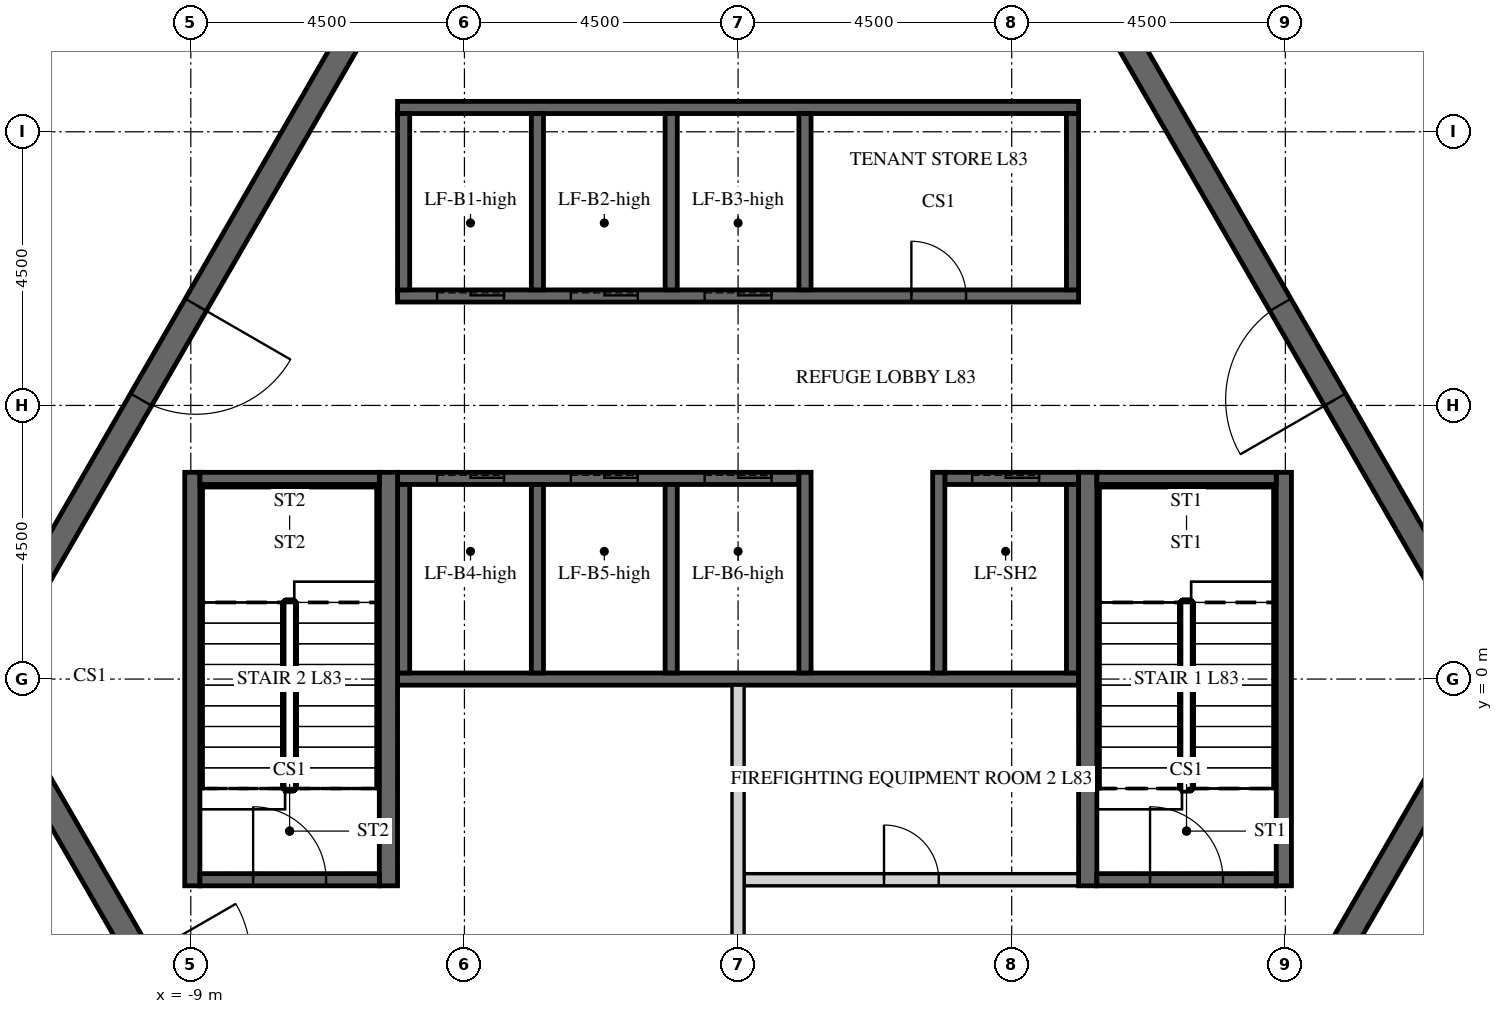
"""IFC4 building model, lengths in metres.
Left out: names, types, materials, properties, quantities, classifications, styles, units other than length and angle.
Written with IfcOpenShell. Run it as: python <this file> out.ifc"""

import sys

from ifc_helpers import new_model, si_unit, direction, frame, frame_2d, origin, place, context, subcontext, project, spatial, polyline, rectangle, outline, extrude, element, fill, save


model = new_model("IFC4")
c1 = context("Model", 3, precision=1e-05, world=origin(), true_north=direction((0.0, 1.0)))
c2 = subcontext(c1, "Body", "Model", "MODEL_VIEW")
j1 = project(units=[si_unit("LENGTHUNIT", "METRE"), si_unit("PLANEANGLEUNIT", "RADIAN")], contexts=[c1])
p1 = place(None, origin())
s1 = spatial("IfcSite", under=j1, at=p1, CompositionType="ELEMENT")
p2 = place(p1, origin())
s2 = spatial("IfcBuilding", under=s1, at=p2, CompositionType="ELEMENT")
p3 = place(p2, frame((0.0, 0.0, 343.5)))
s3 = spatial("IfcBuildingStorey", under=s2, at=p3, CompositionType="ELEMENT", Elevation=343.5)
p4 = place(p3, frame((-6.235, 10.8, -0.3), z_axis=(0.0, 0.0, 1.0), x_axis=(-0.499996419489, -0.866027470984, 0.0)))
e1 = element("IfcWall", 1, at=p4, inside=s3, PredefinedType="SHEAR", context=c2, shape_type="SweptSolid", body=[
    extrude(outline(polyline([(-0.115, -0.2), (12.586, -0.2), (12.355, 0.2), (0.115, 0.2), (-0.115, -0.2)])), origin(), (0.0, 0.0, 1.0), 5.8),
])
p5 = place(p4, frame((5.364, 0.0, 0.3)))
e2 = element("IfcOpeningElement", 2, at=p5, cuts=e1, PredefinedType="OPENING", context=c2, shape_type="SweptSolid", body=[
    extrude(rectangle(XDim=1.8, YDim=2.4, at=frame_2d((0.9, 1.2))), frame((0.0, 0.21, 0.0), z_axis=(0.0, -1.0, 0.0), x_axis=(1.0, 0.0, 0.0)), (0.0, 0.0, 1.0), 0.42),
])
p6 = place(p3, frame((-12.471, 0.0, -0.3), z_axis=(0.0, 0.0, 1.0), x_axis=(0.499996419489, -0.866027470984, 0.0)))
e3 = element("IfcWall", 3, at=p6, inside=s3, PredefinedType="SHEAR", context=c2, shape_type="SweptSolid", body=[
    extrude(outline(polyline([(-0.115, -0.2), (12.586, -0.2), (12.355, 0.2), (0.115, 0.2), (-0.115, -0.2)])), origin(), (0.0, 0.0, 1.0), 5.8),
])
p7 = place(p6, frame((5.306, 0.0, 0.3)))
e4 = element("IfcOpeningElement", 4, at=p7, cuts=e3, PredefinedType="OPENING", context=c2, shape_type="SweptSolid", body=[
    extrude(rectangle(XDim=1.8, YDim=2.4, at=frame_2d((0.9, 1.2))), frame((0.0, 0.21, 0.0), z_axis=(0.0, -1.0, 0.0), x_axis=(1.0, 0.0, 0.0)), (0.0, 0.0, 1.0), 0.42),
])
p8 = place(p3, frame((6.235, -10.8, -0.3), z_axis=(0.0, 0.0, 1.0), x_axis=(0.499996419489, 0.866027470984, 0.0)))
e5 = element("IfcWall", 5, at=p8, inside=s3, PredefinedType="SHEAR", context=c2, shape_type="SweptSolid", body=[
    extrude(outline(polyline([(-0.115, -0.2), (12.586, -0.2), (12.355, 0.2), (0.115, 0.2), (-0.115, -0.2)])), origin(), (0.0, 0.0, 1.0), 5.8),
])
p9 = place(p8, frame((5.364, 0.0, 0.3)))
e6 = element("IfcOpeningElement", 6, at=p9, cuts=e5, PredefinedType="OPENING", context=c2, shape_type="SweptSolid", body=[
    extrude(rectangle(XDim=1.8, YDim=2.4, at=frame_2d((0.9, 1.2))), frame((0.0, 0.21, 0.0), z_axis=(0.0, -1.0, 0.0), x_axis=(1.0, 0.0, 0.0)), (0.0, 0.0, 1.0), 0.42),
])
p10 = place(p3, frame((12.471, 0.0, -0.3), z_axis=(0.0, 0.0, 1.0), x_axis=(-0.499996419489, 0.866027470984, 0.0)))
e7 = element("IfcWall", 7, at=p10, inside=s3, PredefinedType="SHEAR", context=c2, shape_type="SweptSolid", body=[
    extrude(outline(polyline([(-0.115, -0.2), (12.586, -0.2), (12.355, 0.2), (0.115, 0.2), (-0.115, -0.2)])), origin(), (0.0, 0.0, 1.0), 5.8),
])
p11 = place(p10, frame((5.306, 0.0, 0.3)))
e8 = element("IfcOpeningElement", 8, at=p11, cuts=e7, PredefinedType="OPENING", context=c2, shape_type="SweptSolid", body=[
    extrude(rectangle(XDim=1.8, YDim=2.4, at=frame_2d((0.9, 1.2))), frame((0.0, 0.21, 0.0), z_axis=(0.0, -1.0, 0.0), x_axis=(1.0, 0.0, 0.0)), (0.0, 0.0, 1.0), 0.42),
])
p12 = place(p3, frame((-5.6, 6.3, -0.25), z_axis=(0.0, 0.0, 1.0), x_axis=(1.0, 0.0, 0.0)))
e9 = element("IfcWall", 9, at=p12, inside=s3, PredefinedType="SHEAR", context=c2, shape_type="SweptSolid", body=[
    extrude(rectangle(XDim=11.2, YDim=0.2, at=frame_2d((5.6, 0.0))), origin(), (0.0, 0.0, 1.0), 5.75),
])
p13 = place(p12, frame((8.45, 0.0, 0.25)))
e10 = element("IfcOpeningElement", 10, at=p13, cuts=e9, PredefinedType="OPENING", context=c2, shape_type="SweptSolid", body=[
    extrude(rectangle(XDim=0.9, YDim=2.1, at=frame_2d((0.45, 1.05))), frame((0.0, 0.11, 0.0), z_axis=(0.0, -1.0, 0.0), x_axis=(1.0, 0.0, 0.0)), (0.0, 0.0, 1.0), 0.22),
])
p14 = place(p12, frame((0.65, 0.0, 0.25)))
e11 = element("IfcOpeningElement", 11, at=p14, cuts=e9, PredefinedType="OPENING", context=c2, shape_type="SweptSolid", body=[
    extrude(rectangle(XDim=1.1, YDim=2.1, at=frame_2d((0.55, 1.05))), frame((0.0, 0.11, 0.0), z_axis=(0.0, -1.0, 0.0), x_axis=(1.0, 0.0, 0.0)), (0.0, 0.0, 1.0), 0.22),
])
p15 = place(p12, frame((2.85, 0.0, 0.25)))
e12 = element("IfcOpeningElement", 12, at=p15, cuts=e9, PredefinedType="OPENING", context=c2, shape_type="SweptSolid", body=[
    extrude(rectangle(XDim=1.1, YDim=2.1, at=frame_2d((0.55, 1.05))), frame((0.0, 0.11, 0.0), z_axis=(0.0, -1.0, 0.0), x_axis=(1.0, 0.0, 0.0)), (0.0, 0.0, 1.0), 0.22),
])
p16 = place(p12, frame((5.05, 0.0, 0.25)))
e13 = element("IfcOpeningElement", 13, at=p16, cuts=e9, PredefinedType="OPENING", context=c2, shape_type="SweptSolid", body=[
    extrude(rectangle(XDim=1.1, YDim=2.1, at=frame_2d((0.55, 1.05))), frame((0.0, 0.11, 0.0), z_axis=(0.0, -1.0, 0.0), x_axis=(1.0, 0.0, 0.0)), (0.0, 0.0, 1.0), 0.22),
])
p17 = place(p3, frame((-5.6, 9.4, -0.25), z_axis=(0.0, 0.0, 1.0), x_axis=(1.0, 0.0, 0.0)))
e14 = element("IfcWall", 14, at=p17, inside=s3, PredefinedType="SHEAR", context=c2, shape_type="SweptSolid", body=[
    extrude(rectangle(XDim=11.2, YDim=0.2, at=frame_2d((5.6, 0.0))), origin(), (0.0, 0.0, 1.0), 5.75),
])
for number, where, z_axis, x_axis in (
    (15, (-5.5, 6.4, -0.25), (0.0, 0.0, 1.0), (0.0, 1.0, 0.0)),
    (16, (-3.3, 6.4, -0.25), (0.0, 0.0, 1.0), (0.0, 1.0, 0.0)),
    (17, (-1.1, 6.4, -0.25), (0.0, 0.0, 1.0), (0.0, 1.0, 0.0)),
    (18, (1.1, 6.4, -0.25), (0.0, 0.0, 1.0), (0.0, 1.0, 0.0)),
    (19, (5.5, 6.4, -0.25), (0.0, 0.0, 1.0), (0.0, 1.0, 0.0)),
):
    element("IfcWall", number, at=place(p3, frame(where, z_axis=z_axis, x_axis=x_axis)), inside=s3, PredefinedType="SHEAR", context=c2, shape_type="SweptSolid", body=[
        extrude(rectangle(XDim=2.9, YDim=0.2, at=frame_2d((1.45, 0.0))), origin(), (0.0, 0.0, 1.0), 5.75),
    ])
p18 = place(p3, frame((-5.6, 3.3, -0.25), z_axis=(0.0, 0.0, 1.0), x_axis=(1.0, 0.0, 0.0)))
e20 = element("IfcWall", 20, at=p18, inside=s3, PredefinedType="SHEAR", context=c2, shape_type="SweptSolid", body=[
    extrude(rectangle(XDim=6.6, YDim=0.2, at=frame_2d((3.3, 0.0))), origin(), (0.0, 0.0, 1.0), 5.75),
])
p19 = place(p18, frame((0.65, 0.0, 0.25)))
e21 = element("IfcOpeningElement", 21, at=p19, cuts=e20, PredefinedType="OPENING", context=c2, shape_type="SweptSolid", body=[
    extrude(rectangle(XDim=1.1, YDim=2.1, at=frame_2d((0.55, 1.05))), frame((0.0, 0.11, 0.0), z_axis=(0.0, -1.0, 0.0), x_axis=(1.0, 0.0, 0.0)), (0.0, 0.0, 1.0), 0.22),
])
p20 = place(p18, frame((2.85, 0.0, 0.25)))
e22 = element("IfcOpeningElement", 22, at=p20, cuts=e20, PredefinedType="OPENING", context=c2, shape_type="SweptSolid", body=[
    extrude(rectangle(XDim=1.1, YDim=2.1, at=frame_2d((0.55, 1.05))), frame((0.0, 0.11, 0.0), z_axis=(0.0, -1.0, 0.0), x_axis=(1.0, 0.0, 0.0)), (0.0, 0.0, 1.0), 0.22),
])
p21 = place(p18, frame((5.05, 0.0, 0.25)))
e23 = element("IfcOpeningElement", 23, at=p21, cuts=e20, PredefinedType="OPENING", context=c2, shape_type="SweptSolid", body=[
    extrude(rectangle(XDim=1.1, YDim=2.1, at=frame_2d((0.55, 1.05))), frame((0.0, 0.11, 0.0), z_axis=(0.0, -1.0, 0.0), x_axis=(1.0, 0.0, 0.0)), (0.0, 0.0, 1.0), 0.22),
])
p22 = place(p3, frame((3.4, 3.3, -0.25), z_axis=(0.0, 0.0, 1.0), x_axis=(1.0, 0.0, 0.0)))
e24 = element("IfcWall", 24, at=p22, inside=s3, PredefinedType="SHEAR", context=c2, shape_type="SweptSolid", body=[
    extrude(rectangle(XDim=2.2, YDim=0.2, at=frame_2d((1.1, 0.0))), origin(), (0.0, 0.0, 1.0), 5.75),
])
p23 = place(p22, frame((0.45, 0.0, 0.25)))
e25 = element("IfcOpeningElement", 25, at=p23, cuts=e24, PredefinedType="OPENING", context=c2, shape_type="SweptSolid", body=[
    extrude(rectangle(XDim=1.1, YDim=2.1, at=frame_2d((0.55, 1.05))), frame((0.0, 0.11, 0.0), z_axis=(0.0, -1.0, 0.0), x_axis=(1.0, 0.0, 0.0)), (0.0, 0.0, 1.0), 0.22),
])
p24 = place(p3, frame((-5.6, 0.0, -0.25), z_axis=(0.0, 0.0, 1.0), x_axis=(1.0, 0.0, 0.0)))
e26 = element("IfcWall", 26, at=p24, inside=s3, PredefinedType="SHEAR", context=c2, shape_type="SweptSolid", body=[
    extrude(rectangle(XDim=11.2, YDim=0.2, at=frame_2d((5.6, 0.0))), origin(), (0.0, 0.0, 1.0), 5.75),
])
for number, where, z_axis, x_axis in (
    (27, (-5.5, 0.1, -0.25), (0.0, 0.0, 1.0), (0.0, 1.0, 0.0)),
    (28, (-3.3, 0.1, -0.25), (0.0, 0.0, 1.0), (0.0, 1.0, 0.0)),
    (29, (-1.1, 0.1, -0.25), (0.0, 0.0, 1.0), (0.0, 1.0, 0.0)),
):
    element("IfcWall", number, at=place(p3, frame(where, z_axis=z_axis, x_axis=x_axis)), inside=s3, PredefinedType="SHEAR", context=c2, shape_type="SweptSolid", body=[
        extrude(rectangle(XDim=3.1, YDim=0.2, at=frame_2d((1.55, 0.0))), origin(), (0.0, 0.0, 1.0), 5.75),
    ])
for number, where, z_axis, x_axis in (
    (30, (1.1, 0.1, -0.25), (0.0, 0.0, 1.0), (0.0, 1.0, 0.0)),
    (31, (3.3, 0.1, -0.25), (0.0, 0.0, 1.0), (0.0, 1.0, 0.0)),
):
    element("IfcWall", number, at=place(p3, frame(where, z_axis=z_axis, x_axis=x_axis)), inside=s3, PredefinedType="SHEAR", context=c2, shape_type="SweptSolid", body=[
        extrude(rectangle(XDim=3.3, YDim=0.2, at=frame_2d((1.65, 0.0))), origin(), (0.0, 0.0, 1.0), 5.75),
    ])
p25 = place(p3, frame((5.5, 0.1, -0.25), z_axis=(0.0, 0.0, 1.0), x_axis=(0.0, 1.0, 0.0)))
e32 = element("IfcWall", 32, at=p25, inside=s3, PredefinedType="SHEAR", context=c2, shape_type="SweptSolid", body=[
    extrude(rectangle(XDim=3.1, YDim=0.2, at=frame_2d((1.55, 0.0))), origin(), (0.0, 0.0, 1.0), 5.75),
])
p26 = place(p3, frame((0.1, -3.3, 0.0), z_axis=(0.0, 0.0, 1.0), x_axis=(1.0, 0.0, 0.0)))
e33 = element("IfcWall", 33, at=p26, inside=s3, PredefinedType="PARTITIONING", context=c2, shape_type="SweptSolid", body=[
    extrude(rectangle(XDim=5.5, YDim=0.2, at=frame_2d((2.75, 0.0))), origin(), (0.0, 0.0, 1.0), 5.5),
])
p27 = place(p26, frame((2.3, 0.0, 0.0)))
e34 = element("IfcOpeningElement", 34, at=p27, cuts=e33, PredefinedType="OPENING", context=c2, shape_type="SweptSolid", body=[
    extrude(rectangle(XDim=0.9, YDim=2.1, at=frame_2d((0.45, 1.05))), frame((0.0, 0.11, 0.0), z_axis=(0.0, -1.0, 0.0), x_axis=(1.0, 0.0, 0.0)), (0.0, 0.0, 1.0), 0.22),
])
p28 = place(p3, frame((0.0, -6.2, 0.0), z_axis=(0.0, 0.0, 1.0), x_axis=(0.0, 1.0, 0.0)))
e35 = element("IfcWall", 35, at=p28, inside=s3, PredefinedType="PARTITIONING", context=c2, shape_type="SweptSolid", body=[
    extrude(rectangle(XDim=6.1, YDim=0.2, at=frame_2d((3.05, 0.0))), origin(), (0.0, 0.0, 1.0), 5.5),
])
p29 = place(p3, frame((5.75, -3.4, -0.25), z_axis=(0.0, 0.0, 1.0), x_axis=(0.0, 1.0, 0.0)))
e36 = element("IfcWall", 36, at=p29, inside=s3, PredefinedType="SHEAR", context=c2, shape_type="SweptSolid", body=[
    extrude(rectangle(XDim=6.8, YDim=0.3, at=frame_2d((3.4, 0.0))), origin(), (0.0, 0.0, 1.0), 5.75),
])
p30 = place(p3, frame((8.975, -3.4, -0.25), z_axis=(0.0, 0.0, 1.0), x_axis=(0.0, 1.0, 0.0)))
e37 = element("IfcWall", 37, at=p30, inside=s3, PredefinedType="SHEAR", context=c2, shape_type="SweptSolid", body=[
    extrude(rectangle(XDim=6.8, YDim=0.25, at=frame_2d((3.4, 0.0))), origin(), (0.0, 0.0, 1.0), 5.75),
])
p31 = place(p3, frame((5.9, 3.3, -0.25), z_axis=(0.0, 0.0, 1.0), x_axis=(1.0, 0.0, 0.0)))
e38 = element("IfcWall", 38, at=p31, inside=s3, PredefinedType="SHEAR", context=c2, shape_type="SweptSolid", body=[
    extrude(rectangle(XDim=2.95, YDim=0.2, at=frame_2d((1.475, 0.0))), origin(), (0.0, 0.0, 1.0), 5.75),
])
p32 = place(p3, frame((5.9, -3.3, -0.25), z_axis=(0.0, 0.0, 1.0), x_axis=(1.0, 0.0, 0.0)))
e39 = element("IfcWall", 39, at=p32, inside=s3, PredefinedType="SHEAR", context=c2, shape_type="SweptSolid", body=[
    extrude(rectangle(XDim=2.95, YDim=0.2, at=frame_2d((1.475, 0.0))), origin(), (0.0, 0.0, 1.0), 5.75),
])
p33 = place(p32, frame((0.875, 0.0, 0.25)))
e40 = element("IfcOpeningElement", 40, at=p33, cuts=e39, PredefinedType="OPENING", context=c2, shape_type="SweptSolid", body=[
    extrude(rectangle(XDim=1.2, YDim=2.4, at=frame_2d((0.6, 1.2))), frame((0.0, 0.11, 0.0), z_axis=(0.0, -1.0, 0.0), x_axis=(1.0, 0.0, 0.0)), (0.0, 0.0, 1.0), 0.22),
])
p34 = place(p3, frame((-5.75, -3.4, -0.25), z_axis=(0.0, 0.0, 1.0), x_axis=(0.0, 1.0, 0.0)))
e41 = element("IfcWall", 41, at=p34, inside=s3, PredefinedType="SHEAR", context=c2, shape_type="SweptSolid", body=[
    extrude(rectangle(XDim=6.8, YDim=0.3, at=frame_2d((3.4, 0.0))), origin(), (0.0, 0.0, 1.0), 5.75),
])
p35 = place(p3, frame((-8.975, -3.4, -0.25), z_axis=(0.0, 0.0, 1.0), x_axis=(0.0, 1.0, 0.0)))
e42 = element("IfcWall", 42, at=p35, inside=s3, PredefinedType="SHEAR", context=c2, shape_type="SweptSolid", body=[
    extrude(rectangle(XDim=6.8, YDim=0.25, at=frame_2d((3.4, 0.0))), origin(), (0.0, 0.0, 1.0), 5.75),
])
p36 = place(p3, frame((-8.85, 3.3, -0.25), z_axis=(0.0, 0.0, 1.0), x_axis=(1.0, 0.0, 0.0)))
e43 = element("IfcWall", 43, at=p36, inside=s3, PredefinedType="SHEAR", context=c2, shape_type="SweptSolid", body=[
    extrude(rectangle(XDim=2.95, YDim=0.2, at=frame_2d((1.475, 0.0))), origin(), (0.0, 0.0, 1.0), 5.75),
])
p37 = place(p3, frame((-8.85, -3.3, -0.25), z_axis=(0.0, 0.0, 1.0), x_axis=(1.0, 0.0, 0.0)))
e44 = element("IfcWall", 44, at=p37, inside=s3, PredefinedType="SHEAR", context=c2, shape_type="SweptSolid", body=[
    extrude(rectangle(XDim=2.95, YDim=0.2, at=frame_2d((1.475, 0.0))), origin(), (0.0, 0.0, 1.0), 5.75),
])
p38 = place(p37, frame((0.875, 0.0, 0.25)))
e45 = element("IfcOpeningElement", 45, at=p38, cuts=e44, PredefinedType="OPENING", context=c2, shape_type="SweptSolid", body=[
    extrude(rectangle(XDim=1.2, YDim=2.4, at=frame_2d((0.6, 1.2))), frame((0.0, 0.11, 0.0), z_axis=(0.0, -1.0, 0.0), x_axis=(1.0, 0.0, 0.0)), (0.0, 0.0, 1.0), 0.22),
])
p39 = place(p3, frame((-11.01, 19.07, 0.0), z_axis=(0.0, 0.0, 1.0), x_axis=(-0.500012125972, -0.866018402738, 0.0)))
e46 = element("IfcWall", 46, at=p39, inside=s3, PredefinedType="PARTITIONING", context=c2, shape_type="SweptSolid", body=[
    extrude(rectangle(XDim=21.79, YDim=0.2, at=frame_2d((10.895, 0.0))), origin(), (0.0, 0.0, 1.0), 5.5),
])
p40 = place(p39, frame((10.295, 0.0, 0.0)))
e47 = element("IfcOpeningElement", 47, at=p40, cuts=e46, PredefinedType="OPENING", context=c2, shape_type="SweptSolid", body=[
    extrude(rectangle(XDim=1.2, YDim=2.1, at=frame_2d((0.6, 1.05))), frame((0.0, 0.11, 0.0), z_axis=(0.0, -1.0, 0.0), x_axis=(1.0, 0.0, 0.0)), (0.0, 0.0, 1.0), 0.22),
])
p41 = place(p3, frame((11.126, -18.87, 0.0), z_axis=(0.0, 0.0, 1.0), x_axis=(0.499978511878, 0.866037809602, 0.0)))
e48 = element("IfcWall", 48, at=p41, inside=s3, PredefinedType="PARTITIONING", context=c2, shape_type="SweptSolid", body=[
    extrude(rectangle(XDim=21.789, YDim=0.2, at=frame_2d((10.895, 0.0))), origin(), (0.0, 0.0, 1.0), 4.573),
])
p42 = place(p41, frame((10.294, 0.0, 0.0)))
e49 = element("IfcOpeningElement", 49, at=p42, cuts=e48, PredefinedType="OPENING", context=c2, shape_type="SweptSolid", body=[
    extrude(rectangle(XDim=1.2, YDim=2.1, at=frame_2d((0.6, 1.05))), frame((0.0, 0.11, 0.0), z_axis=(0.0, -1.0, 0.0), x_axis=(1.0, 0.0, 0.0)), (0.0, 0.0, 1.0), 0.22),
])
p43 = place(p3, frame((21.962, 0.1, 0.0), z_axis=(0.0, 0.0, 1.0), x_axis=(-0.499975977678, 0.866039272634, 0.0)))
e50 = element("IfcWall", 50, at=p43, inside=s3, PredefinedType="PARTITIONING", context=c2, shape_type="SweptSolid", body=[
    extrude(rectangle(XDim=21.673, YDim=0.2, at=frame_2d((10.837, 0.0))), origin(), (0.0, 0.0, 1.0), 4.573),
])
p44 = place(p5, origin())
e51 = element("IfcDoor", 51, at=p44, inside=s3, OperationType="DOUBLE_DOOR_SINGLE_SWING", PredefinedType="DOOR", context=c2, shape_type="SweptSolid", body=[
    extrude(rectangle(XDim=1.8, YDim=2.4, at=frame_2d((0.9, 1.2))), frame((0.0, 0.025, 0.0), z_axis=(0.0, -1.0, 0.0), x_axis=(1.0, 0.0, 0.0)), (0.0, 0.0, 1.0), 0.05),
])
fill(e2, e51)
p45 = place(p11, origin())
e52 = element("IfcDoor", 52, at=p45, inside=s3, OperationType="DOUBLE_DOOR_SINGLE_SWING", PredefinedType="DOOR", context=c2, shape_type="SweptSolid", body=[
    extrude(rectangle(XDim=1.8, YDim=2.4, at=frame_2d((0.9, 1.2))), frame((0.0, 0.025, 0.0), z_axis=(0.0, -1.0, 0.0), x_axis=(1.0, 0.0, 0.0)), (0.0, 0.0, 1.0), 0.05),
])
fill(e8, e52)
p46 = place(p27, origin())
e53 = element("IfcDoor", 53, at=p46, inside=s3, OperationType="SINGLE_SWING_LEFT", PredefinedType="DOOR", context=c2, shape_type="SweptSolid", body=[
    extrude(rectangle(XDim=0.9, YDim=2.1, at=frame_2d((0.45, 1.05))), frame((0.0, 0.025, 0.0), z_axis=(0.0, -1.0, 0.0), x_axis=(1.0, 0.0, 0.0)), (0.0, 0.0, 1.0), 0.05),
])
fill(e34, e53)
p47 = place(p13, origin())
e54 = element("IfcDoor", 54, at=p47, inside=s3, OperationType="SINGLE_SWING_LEFT", PredefinedType="DOOR", context=c2, shape_type="SweptSolid", body=[
    extrude(rectangle(XDim=0.9, YDim=2.1, at=frame_2d((0.45, 1.05))), frame((0.0, 0.025, 0.0), z_axis=(0.0, -1.0, 0.0), x_axis=(1.0, 0.0, 0.0)), (0.0, 0.0, 1.0), 0.05),
])
fill(e10, e54)
p48 = place(p33, origin())
e55 = element("IfcDoor", 55, at=p48, inside=s3, OperationType="SINGLE_SWING_LEFT", PredefinedType="DOOR", context=c2, shape_type="SweptSolid", body=[
    extrude(rectangle(XDim=1.2, YDim=2.4, at=frame_2d((0.6, 1.2))), frame((0.0, 0.025, 0.0), z_axis=(0.0, -1.0, 0.0), x_axis=(1.0, 0.0, 0.0)), (0.0, 0.0, 1.0), 0.05),
])
fill(e40, e55)
p49 = place(p38, origin())
e56 = element("IfcDoor", 56, at=p49, inside=s3, OperationType="SINGLE_SWING_LEFT", PredefinedType="DOOR", context=c2, shape_type="SweptSolid", body=[
    extrude(rectangle(XDim=1.2, YDim=2.4, at=frame_2d((0.6, 1.2))), frame((0.0, 0.025, 0.0), z_axis=(0.0, -1.0, 0.0), x_axis=(1.0, 0.0, 0.0)), (0.0, 0.0, 1.0), 0.05),
])
fill(e45, e56)
p50 = place(p14, origin())
e57 = element("IfcDoor", 57, at=p50, inside=s3, OperationType="SLIDING_TO_LEFT", PredefinedType="DOOR", context=c2, shape_type="SweptSolid", body=[
    extrude(rectangle(XDim=1.1, YDim=2.1, at=frame_2d((0.55, 1.05))), frame((0.0, 0.025, 0.0), z_axis=(0.0, -1.0, 0.0), x_axis=(1.0, 0.0, 0.0)), (0.0, 0.0, 1.0), 0.05),
])
fill(e11, e57)
p51 = place(p15, origin())
e58 = element("IfcDoor", 58, at=p51, inside=s3, OperationType="SLIDING_TO_LEFT", PredefinedType="DOOR", context=c2, shape_type="SweptSolid", body=[
    extrude(rectangle(XDim=1.1, YDim=2.1, at=frame_2d((0.55, 1.05))), frame((0.0, 0.025, 0.0), z_axis=(0.0, -1.0, 0.0), x_axis=(1.0, 0.0, 0.0)), (0.0, 0.0, 1.0), 0.05),
])
fill(e12, e58)
p52 = place(p16, origin())
e59 = element("IfcDoor", 59, at=p52, inside=s3, OperationType="SLIDING_TO_LEFT", PredefinedType="DOOR", context=c2, shape_type="SweptSolid", body=[
    extrude(rectangle(XDim=1.1, YDim=2.1, at=frame_2d((0.55, 1.05))), frame((0.0, 0.025, 0.0), z_axis=(0.0, -1.0, 0.0), x_axis=(1.0, 0.0, 0.0)), (0.0, 0.0, 1.0), 0.05),
])
fill(e13, e59)
p53 = place(p19, origin())
e60 = element("IfcDoor", 60, at=p53, inside=s3, OperationType="SLIDING_TO_LEFT", PredefinedType="DOOR", context=c2, shape_type="SweptSolid", body=[
    extrude(rectangle(XDim=1.1, YDim=2.1, at=frame_2d((0.55, 1.05))), frame((0.0, 0.025, 0.0), z_axis=(0.0, -1.0, 0.0), x_axis=(1.0, 0.0, 0.0)), (0.0, 0.0, 1.0), 0.05),
])
fill(e21, e60)
p54 = place(p20, origin())
e61 = element("IfcDoor", 61, at=p54, inside=s3, OperationType="SLIDING_TO_LEFT", PredefinedType="DOOR", context=c2, shape_type="SweptSolid", body=[
    extrude(rectangle(XDim=1.1, YDim=2.1, at=frame_2d((0.55, 1.05))), frame((0.0, 0.025, 0.0), z_axis=(0.0, -1.0, 0.0), x_axis=(1.0, 0.0, 0.0)), (0.0, 0.0, 1.0), 0.05),
])
fill(e22, e61)
p55 = place(p21, origin())
e62 = element("IfcDoor", 62, at=p55, inside=s3, OperationType="SLIDING_TO_LEFT", PredefinedType="DOOR", context=c2, shape_type="SweptSolid", body=[
    extrude(rectangle(XDim=1.1, YDim=2.1, at=frame_2d((0.55, 1.05))), frame((0.0, 0.025, 0.0), z_axis=(0.0, -1.0, 0.0), x_axis=(1.0, 0.0, 0.0)), (0.0, 0.0, 1.0), 0.05),
])
fill(e23, e62)
p56 = place(p23, origin())
e63 = element("IfcDoor", 63, at=p56, inside=s3, OperationType="SLIDING_TO_LEFT", PredefinedType="DOOR", context=c2, shape_type="SweptSolid", body=[
    extrude(rectangle(XDim=1.1, YDim=2.1, at=frame_2d((0.55, 1.05))), frame((0.0, 0.025, 0.0), z_axis=(0.0, -1.0, 0.0), x_axis=(1.0, 0.0, 0.0)), (0.0, 0.0, 1.0), 0.05),
])
fill(e25, e63)
save(model, sys.argv[1])
